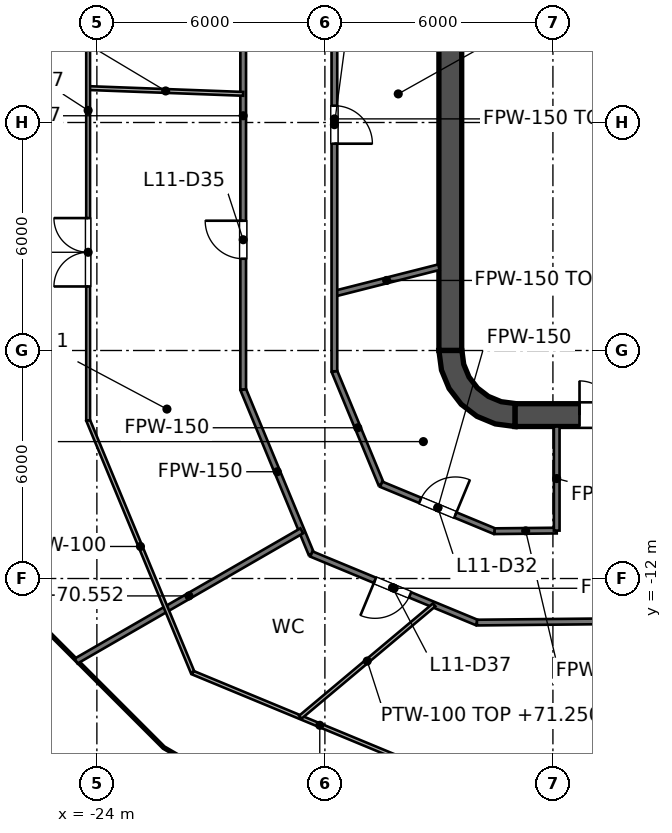
"""IFC4 building model, lengths in metres.
Left out: names, types, materials, properties, quantities, classifications, styles, units other than length and angle.
Written with IfcOpenShell. Run it as: python <this file> out.ifc"""

import sys

from ifc_helpers import new_model, si_unit, direction, frame, frame_2d, origin, place, context, subcontext, project, spatial, polyline, rectangle, outline, extrude, element, fill, save


model = new_model("IFC4")
c1 = context("Model", 3, precision=1e-05, world=origin(), true_north=direction((0.0, 1.0)))
c2 = subcontext(c1, "Body", "Model", "MODEL_VIEW")
j1 = project(units=[si_unit("LENGTHUNIT", "METRE"), si_unit("PLANEANGLEUNIT", "RADIAN")], contexts=[c1])
p1 = place(None, origin())
s1 = spatial("IfcSite", under=j1, at=p1, CompositionType="ELEMENT")
p2 = place(p1, origin())
s2 = spatial("IfcBuilding", under=s1, at=p2, CompositionType="ELEMENT")
p3 = place(p2, frame((0.0, 0.0, 67.2)))
s3 = spatial("IfcBuildingStorey", under=s2, at=p3, CompositionType="ELEMENT", Elevation=67.2)
p4 = place(p3, frame((-13.0, -7.7, 0.0), z_axis=(0.0, 0.0, 1.0), x_axis=(1.0, 0.0, 0.0)))
e1 = element("IfcWall", 1, at=p4, inside=s3, PredefinedType="SHEAR", context=c2, shape_type="SweptSolid", body=[
    extrude(rectangle(XDim=26.0, YDim=0.6, at=frame_2d((13.0, 0.0))), origin(), (0.0, 0.0, 1.0), 4.2),
])
p5 = place(p4, frame((1.7, 0.0, 0.0)))
e2 = element("IfcOpeningElement", 2, at=p5, cuts=e1, PredefinedType="OPENING", context=c2, shape_type="SweptSolid", body=[
    extrude(rectangle(XDim=1.8, YDim=2.1, at=frame_2d((0.9, 1.05))), frame((0.0, 0.3, 0.0), z_axis=(0.0, -1.0, 0.0), x_axis=(1.0, 0.0, 0.0)), (0.0, 0.0, 1.0), 0.6),
])
p6 = place(p4, frame((22.5, 0.0, 0.0)))
e3 = element("IfcOpeningElement", 3, at=p6, cuts=e1, PredefinedType="OPENING", context=c2, shape_type="SweptSolid", body=[
    extrude(rectangle(XDim=1.8, YDim=2.1, at=frame_2d((0.9, 1.05))), frame((0.0, 0.3, 0.0), z_axis=(0.0, -1.0, 0.0), x_axis=(1.0, 0.0, 0.0)), (0.0, 0.0, 1.0), 0.6),
])
p7 = place(p3, frame((-14.7, -6.0, 0.0), z_axis=(0.0, 0.0, 1.0), x_axis=(0.0, 1.0, 0.0)))
e4 = element("IfcWall", 4, at=p7, inside=s3, PredefinedType="SHEAR", context=c2, shape_type="SweptSolid", body=[
    extrude(rectangle(XDim=12.0, YDim=0.6, at=frame_2d((6.0, 0.0))), origin(), (0.0, 0.0, 1.0), 4.2),
])
p8 = place(p3, origin())
e5 = element("IfcWall", 5, at=p8, inside=s3, PredefinedType="SHEAR", context=c2, shape_type="SweptSolid", body=[
    extrude(outline(polyline([(-13.0, -8.0), (-13.0, -7.395), (-13.361, -7.347), (-13.698, -7.208), (-13.986, -6.986), (-14.208, -6.698), (-14.347, -6.361), (-14.395, -6.0), (-15.0, -6.0), (-14.932, -6.518), (-14.732, -7.0), (-14.414, -7.414), (-14.0, -7.732), (-13.518, -7.932), (-13.0, -8.0)])), origin(), (0.0, 0.0, 1.0), 4.2),
])
p9 = place(p3, frame((-11.8, -7.4, 0.0), z_axis=(0.0, 0.0, 1.0), x_axis=(0.0, 1.0, 0.0)))
e6 = element("IfcWall", 6, at=p9, inside=s3, PredefinedType="SOLIDWALL", context=c2, shape_type="SweptSolid", body=[
    extrude(rectangle(XDim=14.8, YDim=0.4, at=frame_2d((7.4, 0.0))), origin(), (0.0, 0.0, 1.0), 4.05),
])
p10 = place(p9, frame((11.2, 0.0, 0.0)))
e7 = element("IfcOpeningElement", 7, at=p10, cuts=e6, PredefinedType="OPENING", context=c2, shape_type="SweptSolid", body=[
    extrude(rectangle(XDim=1.1, YDim=2.1, at=frame_2d((0.55, 1.05))), frame((0.0, 0.2, 0.0), z_axis=(0.0, -1.0, 0.0), x_axis=(1.0, 0.0, 0.0)), (0.0, 0.0, 1.0), 0.4),
])
p11 = place(p9, frame((8.3, 0.0, 0.0)))
e8 = element("IfcOpeningElement", 8, at=p11, cuts=e6, PredefinedType="OPENING", context=c2, shape_type="SweptSolid", body=[
    extrude(rectangle(XDim=1.1, YDim=2.1, at=frame_2d((0.55, 1.05))), frame((0.0, 0.2, 0.0), z_axis=(0.0, -1.0, 0.0), x_axis=(1.0, 0.0, 0.0)), (0.0, 0.0, 1.0), 0.4),
])
p12 = place(p9, frame((5.4, 0.0, 0.0)))
e9 = element("IfcOpeningElement", 9, at=p12, cuts=e6, PredefinedType="OPENING", context=c2, shape_type="SweptSolid", body=[
    extrude(rectangle(XDim=1.1, YDim=2.1, at=frame_2d((0.55, 1.05))), frame((0.0, 0.2, 0.0), z_axis=(0.0, -1.0, 0.0), x_axis=(1.0, 0.0, 0.0)), (0.0, 0.0, 1.0), 0.4),
])
p13 = place(p9, frame((13.552, 0.0, 0.0)))
e10 = element("IfcOpeningElement", 10, at=p13, cuts=e6, PredefinedType="OPENING", context=c2, shape_type="SweptSolid", body=[
    extrude(rectangle(XDim=0.9, YDim=2.1, at=frame_2d((0.45, 1.05))), frame((0.0, 0.2, 0.0), z_axis=(0.0, -1.0, 0.0), x_axis=(1.0, 0.0, 0.0)), (0.0, 0.0, 1.0), 0.4),
])
p14 = place(p9, frame((0.347, 0.0, 0.0)))
e11 = element("IfcOpeningElement", 11, at=p14, cuts=e6, PredefinedType="OPENING", context=c2, shape_type="SweptSolid", body=[
    extrude(rectangle(XDim=0.9, YDim=2.1, at=frame_2d((0.45, 1.05))), frame((0.0, 0.2, 0.0), z_axis=(0.0, -1.0, 0.0), x_axis=(1.0, 0.0, 0.0)), (0.0, 0.0, 1.0), 0.4),
])
e12 = element("IfcWall", 12, at=p8, inside=s3, PredefinedType="SOLIDWALL", context=c2, shape_type="SweptSolid", body=[
    extrude(outline(polyline([(-12.0, -5.925), (-12.0, -5.675), (-14.15, -5.675), (-14.15, -3.025), (-12.0, -3.025), (-12.0, -2.775), (-14.15, -2.775), (-14.15, -0.125), (-12.0, -0.125), (-12.0, 0.125), (-14.15, 0.125), (-14.15, 2.775), (-12.0, 2.775), (-12.0, 3.025), (-14.15, 3.025), (-14.15, 5.675), (-12.0, 5.675), (-12.0, 5.925), (-14.15, 5.925), (-14.4, 5.925), (-14.4, 5.675), (-14.4, 3.025), (-14.4, 2.775), (-14.4, 0.125), (-14.4, -0.125), (-14.4, -2.775), (-14.4, -3.025), (-14.4, -5.675), (-14.4, -5.925), (-14.15, -5.925), (-12.0, -5.925)])), origin(), (0.0, 0.0, 1.0), 4.05),
])
p15 = place(p3, frame((-20.15, -7.025, 0.0), z_axis=(0.0, 0.0, 1.0), x_axis=(0.382713655067, -0.923867013279, 0.0)))
e13 = element("IfcWall", 13, at=p15, inside=s3, PredefinedType="PARTITIONING", context=c2, shape_type="SweptSolid", body=[
    extrude(rectangle(XDim=4.688, YDim=0.15, at=frame_2d((2.344, 0.0))), origin(), (0.0, 0.0, 1.0), 3.195),
])
p16 = place(p3, frame((-17.75, -6.547, 0.0), z_axis=(0.0, 0.0, 1.0), x_axis=(0.382760687394, -0.923847528646, 0.0)))
e14 = element("IfcWall", 14, at=p16, inside=s3, PredefinedType="PARTITIONING", context=c2, shape_type="SweptSolid", body=[
    extrude(rectangle(XDim=3.217, YDim=0.15, at=frame_2d((1.608, 0.0))), origin(), (0.0, 0.0, 1.0), 3.195),
])
p17 = place(p3, frame((-18.355, -11.355, 0.0), z_axis=(0.0, 0.0, 1.0), x_axis=(0.923864073191, -0.382720752334, 0.0)))
e15 = element("IfcWall", 15, at=p17, inside=s3, PredefinedType="PARTITIONING", context=c2, shape_type="SweptSolid", body=[
    extrude(rectangle(XDim=4.714, YDim=0.15, at=frame_2d((2.357, 0.0))), origin(), (0.0, 0.0, 1.0), 3.195),
])
p18 = place(p17, frame((1.81, 0.0, 0.0)))
e16 = element("IfcOpeningElement", 16, at=p18, cuts=e15, PredefinedType="OPENING", context=c2, shape_type="SweptSolid", body=[
    extrude(rectangle(XDim=1.0, YDim=2.1, at=frame_2d((0.5, 1.05))), frame((0.0, 0.075, 0.0), z_axis=(0.0, -1.0, 0.0), x_axis=(1.0, 0.0, 0.0)), (0.0, 0.0, 1.0), 0.15),
])
p19 = place(p3, frame((-16.519, -9.519, 0.0), z_axis=(0.0, 0.0, 1.0), x_axis=(0.92385749043, -0.382736642322, 0.0)))
e17 = element("IfcWall", 17, at=p19, inside=s3, PredefinedType="PARTITIONING", context=c2, shape_type="SweptSolid", body=[
    extrude(rectangle(XDim=3.231, YDim=0.15, at=frame_2d((1.615, 0.0))), origin(), (0.0, 0.0, 1.0), 3.195),
])
p20 = place(p19, frame((1.113, 0.0, 0.0)))
e18 = element("IfcOpeningElement", 18, at=p20, cuts=e17, PredefinedType="OPENING", context=c2, shape_type="SweptSolid", body=[
    extrude(rectangle(XDim=1.0, YDim=2.1, at=frame_2d((0.5, 1.05))), frame((0.0, 0.075, 0.0), z_axis=(0.0, -1.0, 0.0), x_axis=(1.0, 0.0, 0.0)), (0.0, 0.0, 1.0), 0.15),
])
p21 = place(p3, frame((-14.0, -13.16, 0.0), z_axis=(0.0, 0.0, 1.0), x_axis=(0.999950971812, 0.009902220598, 0.0)))
e19 = element("IfcWall", 19, at=p21, inside=s3, PredefinedType="PARTITIONING", context=c2, shape_type="SweptSolid", body=[
    extrude(rectangle(XDim=30.991, YDim=0.15, at=frame_2d((15.496, 0.0))), origin(), (0.0, 0.0, 1.0), 3.127),
])
p22 = place(p21, frame((6.643, 0.0, 0.0)))
e20 = element("IfcOpeningElement", 20, at=p22, cuts=e19, PredefinedType="OPENING", context=c2, shape_type="SweptSolid", body=[
    extrude(rectangle(XDim=1.0, YDim=2.1, at=frame_2d((0.5, 1.05))), frame((0.0, 0.075, 0.0), z_axis=(0.0, -1.0, 0.0), x_axis=(1.0, 0.0, 0.0)), (0.0, 0.0, 1.0), 0.15),
])
p23 = place(p21, frame((13.397, 0.0, 0.0)))
e21 = element("IfcOpeningElement", 21, at=p23, cuts=e19, PredefinedType="OPENING", context=c2, shape_type="SweptSolid", body=[
    extrude(rectangle(XDim=1.0, YDim=2.1, at=frame_2d((0.5, 1.05))), frame((0.0, 0.075, 0.0), z_axis=(0.0, -1.0, 0.0), x_axis=(1.0, 0.0, 0.0)), (0.0, 0.0, 1.0), 0.15),
])
p24 = place(p21, frame((15.816, 0.0, 0.0)))
e22 = element("IfcOpeningElement", 22, at=p24, cuts=e19, PredefinedType="OPENING", context=c2, shape_type="SweptSolid", body=[
    extrude(rectangle(XDim=1.0, YDim=2.1, at=frame_2d((0.5, 1.05))), frame((0.0, 0.075, 0.0), z_axis=(0.0, -1.0, 0.0), x_axis=(1.0, 0.0, 0.0)), (0.0, 0.0, 1.0), 0.15),
])
p25 = place(p21, frame((19.718, 0.0, 0.0)))
e23 = element("IfcOpeningElement", 23, at=p25, cuts=e19, PredefinedType="OPENING", context=c2, shape_type="SweptSolid", body=[
    extrude(rectangle(XDim=1.0, YDim=2.1, at=frame_2d((0.5, 1.05))), frame((0.0, 0.075, 0.0), z_axis=(0.0, -1.0, 0.0), x_axis=(1.0, 0.0, 0.0)), (0.0, 0.0, 1.0), 0.15),
])
p26 = place(p21, frame((23.479, 0.0, 0.0)))
e24 = element("IfcOpeningElement", 24, at=p26, cuts=e19, PredefinedType="OPENING", context=c2, shape_type="SweptSolid", body=[
    extrude(rectangle(XDim=1.0, YDim=2.1, at=frame_2d((0.5, 1.05))), frame((0.0, 0.075, 0.0), z_axis=(0.0, -1.0, 0.0), x_axis=(1.0, 0.0, 0.0)), (0.0, 0.0, 1.0), 0.15),
])
p27 = place(p3, frame((-13.534, -10.755, 0.0), z_axis=(0.0, 0.0, 1.0), x_axis=(0.999951383403, 0.009860569446, 0.0)))
e25 = element("IfcWall", 25, at=p27, inside=s3, PredefinedType="PARTITIONING", context=c2, shape_type="SweptSolid", body=[
    extrude(rectangle(XDim=1.634, YDim=0.15, at=frame_2d((0.817, 0.0))), origin(), (0.0, 0.0, 1.0), 4.05),
])
p28 = place(p3, frame((-17.75, -4.505, 0.0), z_axis=(0.0, 0.0, 1.0), x_axis=(0.969332355751, 0.24575350271, 0.0)))
e26 = element("IfcWall", 26, at=p28, inside=s3, PredefinedType="PARTITIONING", context=c2, shape_type="SweptSolid", body=[
    extrude(rectangle(XDim=2.837, YDim=0.15, at=frame_2d((1.418, 0.0))), origin(), (0.0, 0.0, 1.0), 4.05),
])
p29 = place(p3, frame((-24.546, -14.172, 0.0), z_axis=(0.0, 0.0, 1.0), x_axis=(0.866030233461, 0.499991634662, 0.0)))
e27 = element("IfcWall", 27, at=p29, inside=s3, PredefinedType="PARTITIONING", context=c2, shape_type="SweptSolid", body=[
    extrude(rectangle(XDim=6.856, YDim=0.15, at=frame_2d((3.428, 0.0))), origin(), (0.0, 0.0, 1.0), 3.352),
])
p30 = place(p3, frame((-11.9, -10.739, 0.0), z_axis=(0.0, 0.0, 1.0), x_axis=(0.0, 1.0, 0.0)))
e28 = element("IfcWall", 28, at=p30, inside=s3, PredefinedType="PARTITIONING", context=c2, shape_type="SweptSolid", body=[
    extrude(rectangle(XDim=2.739, YDim=0.15, at=frame_2d((1.37, 0.0))), origin(), (0.0, 0.0, 1.0), 3.195),
])
p31 = place(p3, frame((-17.75, -6.547, 0.0), z_axis=(0.0, 0.0, 1.0), x_axis=(0.0, 1.0, 0.0)))
e29 = element("IfcWall", 29, at=p31, inside=s3, PredefinedType="PARTITIONING", context=c2, shape_type="SweptSolid", body=[
    extrude(rectangle(XDim=13.284, YDim=0.15, at=frame_2d((6.642, 0.0))), origin(), (0.0, 0.0, 1.0), 3.127),
])
p32 = place(p31, frame((5.989, 0.0, 0.0)))
e30 = element("IfcOpeningElement", 30, at=p32, cuts=e29, PredefinedType="OPENING", context=c2, shape_type="SweptSolid", body=[
    extrude(rectangle(XDim=1.0, YDim=2.1, at=frame_2d((0.5, 1.05))), frame((0.0, 0.075, 0.0), z_axis=(0.0, -1.0, 0.0), x_axis=(1.0, 0.0, 0.0)), (0.0, 0.0, 1.0), 0.15),
])
p33 = place(p3, frame((-20.15, -7.025, 0.0), z_axis=(0.0, 0.0, 1.0), x_axis=(0.0, 1.0, 0.0)))
e31 = element("IfcWall", 31, at=p33, inside=s3, PredefinedType="PARTITIONING", context=c2, shape_type="SweptSolid", body=[
    extrude(rectangle(XDim=14.405, YDim=0.15, at=frame_2d((7.202, 0.0))), origin(), (0.0, 0.0, 1.0), 3.127),
])
p34 = place(p33, frame((10.592, 0.0, 0.0)))
e32 = element("IfcOpeningElement", 32, at=p34, cuts=e31, PredefinedType="OPENING", context=c2, shape_type="SweptSolid", body=[
    extrude(rectangle(XDim=1.0, YDim=2.1, at=frame_2d((0.5, 1.05))), frame((0.0, 0.075, 0.0), z_axis=(0.0, -1.0, 0.0), x_axis=(1.0, 0.0, 0.0)), (0.0, 0.0, 1.0), 0.15),
])
p35 = place(p33, frame((3.44, 0.0, 0.0)))
e33 = element("IfcOpeningElement", 33, at=p35, cuts=e31, PredefinedType="OPENING", context=c2, shape_type="SweptSolid", body=[
    extrude(rectangle(XDim=1.0, YDim=2.1, at=frame_2d((0.5, 1.05))), frame((0.0, 0.075, 0.0), z_axis=(0.0, -1.0, 0.0), x_axis=(1.0, 0.0, 0.0)), (0.0, 0.0, 1.0), 0.15),
])
p36 = place(p3, frame((-24.23, -7.837, 0.0), z_axis=(0.0, 0.0, 1.0), x_axis=(0.383020677741, -0.923739768779, 0.0)))
e34 = element("IfcWall", 34, at=p36, inside=s3, PredefinedType="PARTITIONING", context=c2, shape_type="SweptSolid", body=[
    extrude(rectangle(XDim=7.188, YDim=0.1, at=frame_2d((3.594, 0.0))), origin(), (0.0, 0.0, 1.0), 3.195),
])
p37 = place(p3, frame((-21.477, -14.477, 0.0), z_axis=(0.0, 0.0, 1.0), x_axis=(0.923776176895, -0.382932859653, 0.0)))
e35 = element("IfcWall", 35, at=p37, inside=s3, PredefinedType="PARTITIONING", context=c2, shape_type="SweptSolid", body=[
    extrude(rectangle(XDim=7.236, YDim=0.1, at=frame_2d((3.618, 0.0))), origin(), (0.0, 0.0, 1.0), 3.195),
])
p38 = place(p3, frame((-24.23, 0.906, 0.0), z_axis=(0.0, 0.0, 1.0), x_axis=(0.99930587629, -0.03725272624, 0.0)))
e36 = element("IfcWall", 36, at=p38, inside=s3, PredefinedType="PARTITIONING", context=c2, shape_type="SweptSolid", body=[
    extrude(rectangle(XDim=4.083, YDim=0.1, at=frame_2d((2.042, 0.0))), origin(), (0.0, 0.0, 1.0), 4.05),
])
p39 = place(p3, frame((-18.647, -15.65, 0.0), z_axis=(0.0, 0.0, 1.0), x_axis=(0.765988260728, 0.642854559312, 0.0)))
e37 = element("IfcWall", 37, at=p39, inside=s3, PredefinedType="PARTITIONING", context=c2, shape_type="SweptSolid", body=[
    extrude(rectangle(XDim=4.598, YDim=0.1, at=frame_2d((2.299, 0.0))), origin(), (0.0, 0.0, 1.0), 4.05),
])
p40 = place(p3, frame((-24.23, -7.837, 0.0), z_axis=(0.0, 0.0, 1.0), x_axis=(0.0, 1.0, 0.0)))
e38 = element("IfcWall", 38, at=p40, inside=s3, PredefinedType="PARTITIONING", context=c2, shape_type="SweptSolid", body=[
    extrude(rectangle(XDim=16.31, YDim=0.1, at=frame_2d((8.155, 0.0))), origin(), (0.0, 0.0, 1.0), 3.127),
])
p41 = place(p40, frame((3.522, 0.0, 0.0)))
e39 = element("IfcOpeningElement", 39, at=p41, cuts=e38, PredefinedType="OPENING", context=c2, shape_type="SweptSolid", body=[
    extrude(rectangle(XDim=1.8, YDim=2.1, at=frame_2d((0.9, 1.05))), frame((0.0, 0.05, 0.0), z_axis=(0.0, -1.0, 0.0), x_axis=(1.0, 0.0, 0.0)), (0.0, 0.0, 1.0), 0.1),
])
p42 = place(p11, origin())
e40 = element("IfcDoor", 40, at=p42, inside=s3, OperationType="DOUBLE_DOOR_SLIDING", PredefinedType="DOOR", context=c2, shape_type="SweptSolid", body=[
    extrude(rectangle(XDim=1.1, YDim=2.1, at=frame_2d((0.55, 1.05))), frame((0.0, 0.025, 0.0), z_axis=(0.0, -1.0, 0.0), x_axis=(1.0, 0.0, 0.0)), (0.0, 0.0, 1.0), 0.05),
])
fill(e8, e40)
p43 = place(p12, origin())
e41 = element("IfcDoor", 41, at=p43, inside=s3, OperationType="DOUBLE_DOOR_SLIDING", PredefinedType="DOOR", context=c2, shape_type="SweptSolid", body=[
    extrude(rectangle(XDim=1.1, YDim=2.1, at=frame_2d((0.55, 1.05))), frame((0.0, 0.025, 0.0), z_axis=(0.0, -1.0, 0.0), x_axis=(1.0, 0.0, 0.0)), (0.0, 0.0, 1.0), 0.05),
])
fill(e9, e41)
p44 = place(p14, origin())
e42 = element("IfcDoor", 42, at=p44, inside=s3, OperationType="SINGLE_SWING_LEFT", PredefinedType="DOOR", context=c2, shape_type="SweptSolid", body=[
    extrude(rectangle(XDim=0.9, YDim=2.1, at=frame_2d((0.45, 1.05))), frame((0.0, 0.025, 0.0), z_axis=(0.0, -1.0, 0.0), x_axis=(1.0, 0.0, 0.0)), (0.0, 0.0, 1.0), 0.05),
])
fill(e11, e42)
p45 = place(p5, origin())
e43 = element("IfcDoor", 43, at=p45, inside=s3, OperationType="DOUBLE_DOOR_SINGLE_SWING", PredefinedType="DOOR", context=c2, shape_type="SweptSolid", body=[
    extrude(rectangle(XDim=1.8, YDim=2.1, at=frame_2d((0.9, 1.05))), frame((0.0, 0.025, 0.0), z_axis=(0.0, -1.0, 0.0), x_axis=(1.0, 0.0, 0.0)), (0.0, 0.0, 1.0), 0.05),
])
fill(e2, e43)
p46 = place(p32, origin())
e44 = element("IfcDoor", 44, at=p46, inside=s3, OperationType="SINGLE_SWING_LEFT", PredefinedType="DOOR", context=c2, shape_type="SweptSolid", body=[
    extrude(rectangle(XDim=1.0, YDim=2.1, at=frame_2d((0.5, 1.05))), frame((0.0, 0.025, 0.0), z_axis=(0.0, -1.0, 0.0), x_axis=(1.0, 0.0, 0.0)), (0.0, 0.0, 1.0), 0.05),
])
fill(e30, e44)
p47 = place(p20, origin())
e45 = element("IfcDoor", 45, at=p47, inside=s3, OperationType="SINGLE_SWING_RIGHT", PredefinedType="DOOR", context=c2, shape_type="SweptSolid", body=[
    extrude(rectangle(XDim=1.0, YDim=2.1, at=frame_2d((0.5, 1.05))), frame((0.0, 0.025, 0.0), z_axis=(0.0, -1.0, 0.0), x_axis=(1.0, 0.0, 0.0)), (0.0, 0.0, 1.0), 0.05),
])
fill(e18, e45)
p48 = place(p35, origin())
e46 = element("IfcDoor", 46, at=p48, inside=s3, OperationType="SINGLE_SWING_RIGHT", PredefinedType="DOOR", context=c2, shape_type="SweptSolid", body=[
    extrude(rectangle(XDim=1.0, YDim=2.1, at=frame_2d((0.5, 1.05))), frame((0.0, 0.025, 0.0), z_axis=(0.0, -1.0, 0.0), x_axis=(1.0, 0.0, 0.0)), (0.0, 0.0, 1.0), 0.05),
])
fill(e33, e46)
p49 = place(p41, origin())
e47 = element("IfcDoor", 47, at=p49, inside=s3, OperationType="DOUBLE_DOOR_SINGLE_SWING", PredefinedType="DOOR", context=c2, shape_type="SweptSolid", body=[
    extrude(rectangle(XDim=1.8, YDim=2.1, at=frame_2d((0.9, 1.05))), frame((0.0, 0.025, 0.0), z_axis=(0.0, -1.0, 0.0), x_axis=(1.0, 0.0, 0.0)), (0.0, 0.0, 1.0), 0.05),
])
fill(e39, e47)
p50 = place(p18, origin())
e48 = element("IfcDoor", 48, at=p50, inside=s3, OperationType="SINGLE_SWING_LEFT", PredefinedType="DOOR", context=c2, shape_type="SweptSolid", body=[
    extrude(rectangle(XDim=1.0, YDim=2.1, at=frame_2d((0.5, 1.05))), frame((0.0, 0.025, 0.0), z_axis=(0.0, -1.0, 0.0), x_axis=(1.0, 0.0, 0.0)), (0.0, 0.0, 1.0), 0.05),
])
fill(e16, e48)
save(model, sys.argv[1])
